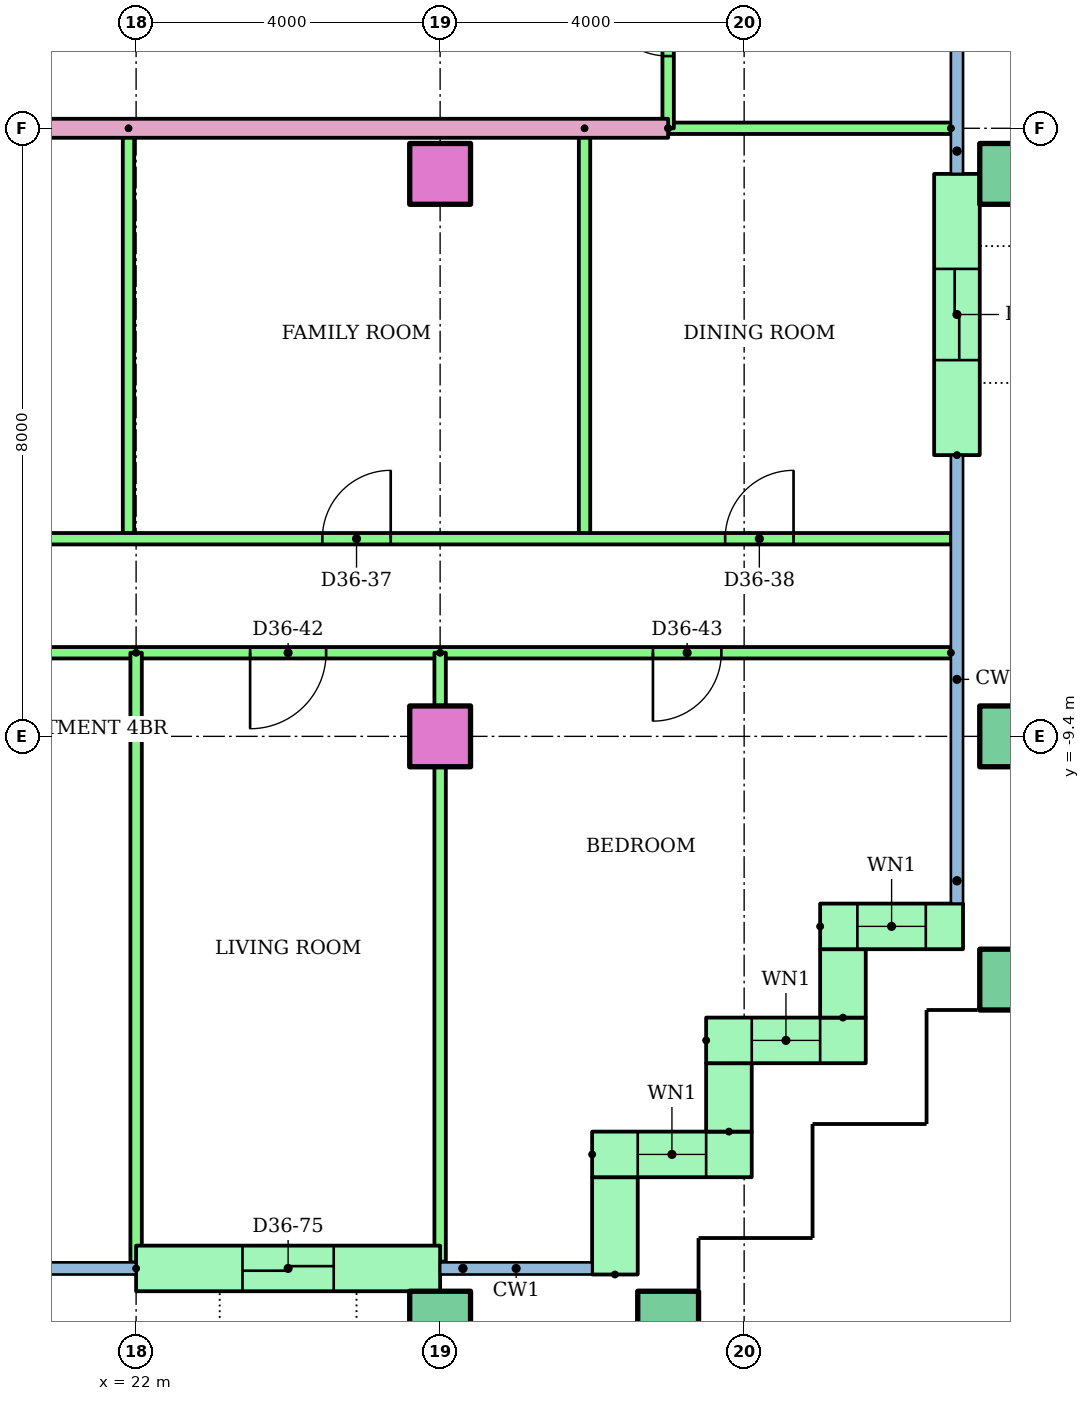
"""IFC4 building model, lengths in metres.
Left out: names, types, materials, properties, quantities, classifications, styles, units other than length and angle.
Written with IfcOpenShell. Run it as: python <this file> out.ifc"""

import sys

from ifc_helpers import new_model, si_unit, direction, frame, frame_2d, origin, origin_2d, place, context, subcontext, project, spatial, rectangle, hollow_rectangle, extrude, element, fill, save


model = new_model("IFC4")
c1 = context("Model", 3, precision=1e-05, world=origin(), true_north=direction((0.0, 1.0)))
c2 = subcontext(c1, "Body", "Model", "MODEL_VIEW")
j1 = project(units=[si_unit("LENGTHUNIT", "METRE"), si_unit("PLANEANGLEUNIT", "RADIAN")], contexts=[c1])
p1 = place(None, origin())
s1 = spatial("IfcSite", under=j1, at=p1, CompositionType="ELEMENT")
p2 = place(p1, origin())
s2 = spatial("IfcBuilding", under=s1, at=p2, CompositionType="ELEMENT")
p3 = place(p2, frame((0.0, 0.0, 139.0)))
s3 = spatial("IfcBuildingStorey", under=s2, at=p3, CompositionType="ELEMENT", Elevation=139.0)
for number, where in (
    (1, (26.0, -17.1, 0.0)),
    (2, (29.0, -17.1, 0.0)),
    (3, (33.5, -12.6, 0.0)),
):
    element("IfcColumn", number, at=place(p3, frame(where)), inside=s3, PredefinedType="COLUMN", context=c2, shape_type="SweptSolid", body=[
        extrude(hollow_rectangle(XDim=0.8, YDim=0.8, WallThickness=0.04, at=origin_2d()), origin(), (0.0, 0.0, 1.0), 3.2),
    ])
p4 = place(p3, frame((26.0, -9.4, 0.0)))
e4 = element("IfcColumn", 4, at=p4, inside=s3, PredefinedType="COLUMN", context=c2, shape_type="SweptSolid", body=[
    extrude(rectangle(XDim=0.8, YDim=0.8, at=origin_2d()), origin(), (0.0, 0.0, 1.0), 3.2),
])
p5 = place(p3, frame((33.5, -9.4, 0.0)))
e5 = element("IfcColumn", 5, at=p5, inside=s3, PredefinedType="COLUMN", context=c2, shape_type="SweptSolid", body=[
    extrude(hollow_rectangle(XDim=0.8, YDim=0.8, WallThickness=0.04, at=origin_2d()), origin(), (0.0, 0.0, 1.0), 3.2),
])
p6 = place(p3, frame((26.0, -2.0, 0.0)))
e6 = element("IfcColumn", 6, at=p6, inside=s3, PredefinedType="COLUMN", context=c2, shape_type="SweptSolid", body=[
    extrude(rectangle(XDim=0.8, YDim=0.8, at=origin_2d()), origin(), (0.0, 0.0, 1.0), 3.2),
])
p7 = place(p3, frame((33.5, -2.0, 0.0)))
e7 = element("IfcColumn", 7, at=p7, inside=s3, PredefinedType="COLUMN", context=c2, shape_type="SweptSolid", body=[
    extrude(hollow_rectangle(XDim=0.8, YDim=0.8, WallThickness=0.04, at=origin_2d()), origin(), (0.0, 0.0, 1.0), 3.2),
])
p8 = place(p3, frame((22.0, -16.4, 0.0)))
e8 = element("IfcWall", 8, at=p8, inside=s3, PredefinedType="STANDARD", context=c2, shape_type="SweptSolid", body=[
    extrude(rectangle(XDim=4.0, YDim=0.6, at=frame_2d((2.0, 0.0))), origin(), (0.0, 0.0, 1.0), 2.92),
])
p9 = place(p8, frame((1.4, 0.0, 0.0)))
e9 = element("IfcOpeningElement", 9, at=p9, cuts=e8, PredefinedType="OPENING", context=c2, shape_type="SweptSolid", body=[
    extrude(rectangle(XDim=1.2, YDim=2.1, at=frame_2d((0.6, 1.05))), frame((0.0, 0.31, 0.0), z_axis=(0.0, -1.0, 0.0), x_axis=(1.0, 0.0, 0.0)), (0.0, 0.0, 1.0), 0.62),
])
p10 = place(p3, frame((28.3, -16.48, 0.0), z_axis=(0.0, 0.0, 1.0), x_axis=(0.0, 1.0, 0.0)))
e10 = element("IfcWall", 10, at=p10, inside=s3, PredefinedType="STANDARD", context=c2, shape_type="SweptSolid", body=[
    extrude(rectangle(XDim=1.28, YDim=0.6, at=frame_2d((0.64, 0.0))), origin(), (0.0, 0.0, 1.0), 2.92),
])
p11 = place(p3, frame((28.0, -14.9, 0.0)))
e11 = element("IfcWall", 11, at=p11, inside=s3, PredefinedType="STANDARD", context=c2, shape_type="SweptSolid", body=[
    extrude(rectangle(XDim=2.1, YDim=0.6, at=frame_2d((1.05, 0.0))), origin(), (0.0, 0.0, 1.0), 2.92),
])
p12 = place(p11, frame((0.6, 0.0, 0.9)))
e12 = element("IfcOpeningElement", 12, at=p12, cuts=e11, PredefinedType="OPENING", context=c2, shape_type="SweptSolid", body=[
    extrude(rectangle(XDim=0.9, YDim=1.5, at=frame_2d((0.45, 0.75))), frame((0.0, 0.31, 0.0), z_axis=(0.0, -1.0, 0.0), x_axis=(1.0, 0.0, 0.0)), (0.0, 0.0, 1.0), 0.62),
])
p13 = place(p3, frame((29.8, -14.6, 0.0), z_axis=(0.0, 0.0, 1.0), x_axis=(0.0, 1.0, 0.0)))
e13 = element("IfcWall", 13, at=p13, inside=s3, PredefinedType="STANDARD", context=c2, shape_type="SweptSolid", body=[
    extrude(rectangle(XDim=0.9, YDim=0.6, at=frame_2d((0.45, 0.0))), origin(), (0.0, 0.0, 1.0), 2.92),
])
p14 = place(p3, frame((29.5, -13.4, 0.0)))
e14 = element("IfcWall", 14, at=p14, inside=s3, PredefinedType="STANDARD", context=c2, shape_type="SweptSolid", body=[
    extrude(rectangle(XDim=2.1, YDim=0.6, at=frame_2d((1.05, 0.0))), origin(), (0.0, 0.0, 1.0), 2.92),
])
p15 = place(p14, frame((0.6, 0.0, 0.9)))
e15 = element("IfcOpeningElement", 15, at=p15, cuts=e14, PredefinedType="OPENING", context=c2, shape_type="SweptSolid", body=[
    extrude(rectangle(XDim=0.9, YDim=1.5, at=frame_2d((0.45, 0.75))), frame((0.0, 0.31, 0.0), z_axis=(0.0, -1.0, 0.0), x_axis=(1.0, 0.0, 0.0)), (0.0, 0.0, 1.0), 0.62),
])
p16 = place(p3, frame((31.3, -13.1, 0.0), z_axis=(0.0, 0.0, 1.0), x_axis=(0.0, 1.0, 0.0)))
e16 = element("IfcWall", 16, at=p16, inside=s3, PredefinedType="STANDARD", context=c2, shape_type="SweptSolid", body=[
    extrude(rectangle(XDim=0.9, YDim=0.6, at=frame_2d((0.45, 0.0))), origin(), (0.0, 0.0, 1.0), 2.92),
])
p17 = place(p3, frame((31.0, -11.9, 0.0)))
e17 = element("IfcWall", 17, at=p17, inside=s3, PredefinedType="STANDARD", context=c2, shape_type="SweptSolid", body=[
    extrude(rectangle(XDim=1.88, YDim=0.6, at=frame_2d((0.94, 0.0))), origin(), (0.0, 0.0, 1.0), 2.92),
])
p18 = place(p17, frame((0.49, 0.0, 0.9)))
e18 = element("IfcOpeningElement", 18, at=p18, cuts=e17, PredefinedType="OPENING", context=c2, shape_type="SweptSolid", body=[
    extrude(rectangle(XDim=0.9, YDim=1.5, at=frame_2d((0.45, 0.75))), frame((0.0, 0.31, 0.0), z_axis=(0.0, -1.0, 0.0), x_axis=(1.0, 0.0, 0.0)), (0.0, 0.0, 1.0), 0.62),
])
p19 = place(p3, frame((32.8, -5.7, 0.0), z_axis=(0.0, 0.0, 1.0), x_axis=(0.0, 1.0, 0.0)))
e19 = element("IfcWall", 19, at=p19, inside=s3, PredefinedType="STANDARD", context=c2, shape_type="SweptSolid", body=[
    extrude(rectangle(XDim=3.7, YDim=0.6, at=frame_2d((1.85, 0.0))), origin(), (0.0, 0.0, 1.0), 2.92),
])
p20 = place(p19, frame((1.25, 0.0, 0.0)))
e20 = element("IfcOpeningElement", 20, at=p20, cuts=e19, PredefinedType="OPENING", context=c2, shape_type="SweptSolid", body=[
    extrude(rectangle(XDim=1.2, YDim=2.1, at=frame_2d((0.6, 1.05))), frame((0.0, 0.31, 0.0), z_axis=(0.0, -1.0, 0.0), x_axis=(1.0, 0.0, 0.0)), (0.0, 0.0, 1.0), 0.62),
])
for number, where, z_axis, x_axis in (
    (21, (21.9, -1.4, 0.0), (0.0, 0.0, 1.0), (0.0, -1.0, 0.0)),
    (22, (27.9, -1.4, 0.0), (0.0, 0.0, 1.0), (0.0, -1.0, 0.0)),
):
    element("IfcWall", number, at=place(p3, frame(where, z_axis=z_axis, x_axis=x_axis)), inside=s3, PredefinedType="PARTITIONING", context=c2, shape_type="SweptSolid", body=[
        extrude(rectangle(XDim=5.4, YDim=0.15, at=frame_2d((2.7, 0.0))), origin(), (0.0, 0.0, 1.0), 2.4),
    ])
p21 = place(p3, frame((12.0, -6.8, 0.0)))
e23 = element("IfcWall", 23, at=p21, inside=s3, PredefinedType="PARTITIONING", context=c2, shape_type="SweptSolid", body=[
    extrude(rectangle(XDim=20.72, YDim=0.15, at=frame_2d((10.36, 0.0))), origin(), (0.0, 0.0, 1.0), 2.4),
])
p22 = place(p21, frame((5.7, 0.0, 0.0)))
e24 = element("IfcOpeningElement", 24, at=p22, cuts=e23, PredefinedType="OPENING", context=c2, shape_type="SweptSolid", body=[
    extrude(rectangle(XDim=0.9, YDim=2.1, at=frame_2d((0.45, 1.05))), frame((0.0, 0.085, 0.0), z_axis=(0.0, -1.0, 0.0), x_axis=(1.0, 0.0, 0.0)), (0.0, 0.0, 1.0), 0.17),
])
p23 = place(p21, frame((12.45, 0.0, 0.0)))
e25 = element("IfcOpeningElement", 25, at=p23, cuts=e23, PredefinedType="OPENING", context=c2, shape_type="SweptSolid", body=[
    extrude(rectangle(XDim=0.9, YDim=2.1, at=frame_2d((0.45, 1.05))), frame((0.0, 0.085, 0.0), z_axis=(0.0, -1.0, 0.0), x_axis=(1.0, 0.0, 0.0)), (0.0, 0.0, 1.0), 0.17),
])
p24 = place(p21, frame((17.75, 0.0, 0.0)))
e26 = element("IfcOpeningElement", 26, at=p24, cuts=e23, PredefinedType="OPENING", context=c2, shape_type="SweptSolid", body=[
    extrude(rectangle(XDim=0.9, YDim=2.1, at=frame_2d((0.45, 1.05))), frame((0.0, 0.085, 0.0), z_axis=(0.0, -1.0, 0.0), x_axis=(1.0, 0.0, 0.0)), (0.0, 0.0, 1.0), 0.17),
])
p25 = place(p3, frame((32.72, -8.3, 0.0), z_axis=(0.0, 0.0, 1.0), x_axis=(-1.0, 0.0, 0.0)))
e27 = element("IfcWall", 27, at=p25, inside=s3, PredefinedType="PARTITIONING", context=c2, shape_type="SweptSolid", body=[
    extrude(rectangle(XDim=22.72, YDim=0.15, at=frame_2d((11.36, 0.0))), origin(), (0.0, 0.0, 1.0), 2.4),
])
p26 = place(p25, frame((20.27, 0.0, 0.0)))
e28 = element("IfcOpeningElement", 28, at=p26, cuts=e27, PredefinedType="OPENING", context=c2, shape_type="SweptSolid", body=[
    extrude(rectangle(XDim=0.9, YDim=2.1, at=frame_2d((0.45, 1.05))), frame((0.0, 0.085, 0.0), z_axis=(0.0, -1.0, 0.0), x_axis=(1.0, 0.0, 0.0)), (0.0, 0.0, 1.0), 0.17),
])
p27 = place(p25, frame((16.27, 0.0, 0.0)))
e29 = element("IfcOpeningElement", 29, at=p27, cuts=e27, PredefinedType="OPENING", context=c2, shape_type="SweptSolid", body=[
    extrude(rectangle(XDim=0.9, YDim=2.1, at=frame_2d((0.45, 1.05))), frame((0.0, 0.085, 0.0), z_axis=(0.0, -1.0, 0.0), x_axis=(1.0, 0.0, 0.0)), (0.0, 0.0, 1.0), 0.17),
])
p28 = place(p25, frame((12.27, 0.0, 0.0)))
e30 = element("IfcOpeningElement", 30, at=p28, cuts=e27, PredefinedType="OPENING", context=c2, shape_type="SweptSolid", body=[
    extrude(rectangle(XDim=0.9, YDim=2.1, at=frame_2d((0.45, 1.05))), frame((0.0, 0.085, 0.0), z_axis=(0.0, -1.0, 0.0), x_axis=(1.0, 0.0, 0.0)), (0.0, 0.0, 1.0), 0.17),
])
p29 = place(p25, frame((8.22, 0.0, 0.0)))
e31 = element("IfcOpeningElement", 31, at=p29, cuts=e27, PredefinedType="OPENING", context=c2, shape_type="SweptSolid", body=[
    extrude(rectangle(XDim=1.0, YDim=2.1, at=frame_2d((0.5, 1.05))), frame((0.0, 0.085, 0.0), z_axis=(0.0, -1.0, 0.0), x_axis=(1.0, 0.0, 0.0)), (0.0, 0.0, 1.0), 0.17),
])
p30 = place(p25, frame((3.02, 0.0, 0.0)))
e32 = element("IfcOpeningElement", 32, at=p30, cuts=e27, PredefinedType="OPENING", context=c2, shape_type="SweptSolid", body=[
    extrude(rectangle(XDim=0.9, YDim=2.1, at=frame_2d((0.45, 1.05))), frame((0.0, 0.085, 0.0), z_axis=(0.0, -1.0, 0.0), x_axis=(1.0, 0.0, 0.0)), (0.0, 0.0, 1.0), 0.17),
])
p31 = place(p3, frame((22.0, -8.3, 0.0), z_axis=(0.0, 0.0, 1.0), x_axis=(0.0, -1.0, 0.0)))
e33 = element("IfcWall", 33, at=p31, inside=s3, PredefinedType="PARTITIONING", context=c2, shape_type="SweptSolid", body=[
    extrude(rectangle(XDim=8.021, YDim=0.15, at=frame_2d((4.01, 0.0))), origin(), (0.0, 0.0, 1.0), 2.4),
])
p32 = place(p3, frame((26.0, -8.3, 0.0), z_axis=(0.0, 0.0, 1.0), x_axis=(0.0, -1.0, 0.0)))
e34 = element("IfcWall", 34, at=p32, inside=s3, PredefinedType="PARTITIONING", context=c2, shape_type="SweptSolid", body=[
    extrude(rectangle(XDim=8.01, YDim=0.15, at=frame_2d((4.005, 0.0))), origin(), (0.0, 0.0, 1.0), 2.4),
])
p33 = place(p3, frame((29.0, -1.4, 0.0), z_axis=(0.0, 0.0, 1.0), x_axis=(-1.0, 0.0, 0.0)))
e35 = element("IfcWall", 35, at=p33, inside=s3, PredefinedType="PARTITIONING", context=c2, shape_type="SweptSolid", body=[
    extrude(rectangle(XDim=15.0, YDim=0.25, at=frame_2d((7.5, 0.0))), origin(), (0.0, 0.0, 1.0), 2.4),
])
p34 = place(p3, frame((32.72, -1.4, 0.0), z_axis=(0.0, 0.0, 1.0), x_axis=(-1.0, 0.0, 0.0)))
e36 = element("IfcWall", 36, at=p34, inside=s3, PredefinedType="PARTITIONING", context=c2, shape_type="SweptSolid", body=[
    extrude(rectangle(XDim=3.72, YDim=0.15, at=frame_2d((1.86, 0.0))), origin(), (0.0, 0.0, 1.0), 2.4),
])
p35 = place(p3, frame((29.0, -1.4, 0.0), z_axis=(0.0, 0.0, 1.0), x_axis=(0.0, 1.0, 0.0)))
e37 = element("IfcWall", 37, at=p35, inside=s3, PredefinedType="PARTITIONING", context=c2, shape_type="SweptSolid", body=[
    extrude(rectangle(XDim=2.8, YDim=0.15, at=frame_2d((1.4, 0.0))), origin(), (0.0, 0.0, 1.0), 2.4),
])
p36 = place(p35, frame((0.95, 0.0, 0.0)))
e38 = element("IfcOpeningElement", 38, at=p36, cuts=e37, PredefinedType="OPENING", context=c2, shape_type="SweptSolid", body=[
    extrude(rectangle(XDim=0.9, YDim=2.1, at=frame_2d((0.45, 1.05))), frame((0.0, 0.085, 0.0), z_axis=(0.0, -1.0, 0.0), x_axis=(1.0, 0.0, 0.0)), (0.0, 0.0, 1.0), 0.17),
])
p37 = place(p12, origin())
e39 = element("IfcWindow", 39, at=p37, inside=s3, PartitioningType="SINGLE_PANEL", PredefinedType="WINDOW", context=c2, shape_type="SweptSolid", body=[
    extrude(rectangle(XDim=0.9, YDim=1.5, at=frame_2d((0.45, 0.75))), frame((0.0, 0.03, 0.0), z_axis=(0.0, -1.0, 0.0), x_axis=(1.0, 0.0, 0.0)), (0.0, 0.0, 1.0), 0.06),
])
fill(e12, e39)
p38 = place(p15, origin())
e40 = element("IfcWindow", 40, at=p38, inside=s3, PartitioningType="SINGLE_PANEL", PredefinedType="WINDOW", context=c2, shape_type="SweptSolid", body=[
    extrude(rectangle(XDim=0.9, YDim=1.5, at=frame_2d((0.45, 0.75))), frame((0.0, 0.03, 0.0), z_axis=(0.0, -1.0, 0.0), x_axis=(1.0, 0.0, 0.0)), (0.0, 0.0, 1.0), 0.06),
])
fill(e15, e40)
p39 = place(p18, origin())
e41 = element("IfcWindow", 41, at=p39, inside=s3, PartitioningType="SINGLE_PANEL", PredefinedType="WINDOW", context=c2, shape_type="SweptSolid", body=[
    extrude(rectangle(XDim=0.9, YDim=1.5, at=frame_2d((0.45, 0.75))), frame((0.0, 0.03, 0.0), z_axis=(0.0, -1.0, 0.0), x_axis=(1.0, 0.0, 0.0)), (0.0, 0.0, 1.0), 0.06),
])
fill(e18, e41)
p40 = place(p23, origin())
e42 = element("IfcDoor", 42, at=p40, inside=s3, OperationType="SINGLE_SWING_RIGHT", PredefinedType="DOOR", context=c2, shape_type="SweptSolid", body=[
    extrude(rectangle(XDim=0.9, YDim=2.1, at=frame_2d((0.45, 1.05))), frame((0.0, 0.025, 0.0), z_axis=(0.0, -1.0, 0.0), x_axis=(1.0, 0.0, 0.0)), (0.0, 0.0, 1.0), 0.05),
])
fill(e25, e42)
p41 = place(p24, origin())
e43 = element("IfcDoor", 43, at=p41, inside=s3, OperationType="SINGLE_SWING_RIGHT", PredefinedType="DOOR", context=c2, shape_type="SweptSolid", body=[
    extrude(rectangle(XDim=0.9, YDim=2.1, at=frame_2d((0.45, 1.05))), frame((0.0, 0.025, 0.0), z_axis=(0.0, -1.0, 0.0), x_axis=(1.0, 0.0, 0.0)), (0.0, 0.0, 1.0), 0.05),
])
fill(e26, e43)
p42 = place(p29, origin())
e44 = element("IfcDoor", 44, at=p42, inside=s3, OperationType="SINGLE_SWING_RIGHT", PredefinedType="DOOR", context=c2, shape_type="SweptSolid", body=[
    extrude(rectangle(XDim=1.0, YDim=2.1, at=frame_2d((0.5, 1.05))), frame((0.0, 0.025, 0.0), z_axis=(0.0, -1.0, 0.0), x_axis=(1.0, 0.0, 0.0)), (0.0, 0.0, 1.0), 0.05),
])
fill(e31, e44)
p43 = place(p30, origin())
e45 = element("IfcDoor", 45, at=p43, inside=s3, OperationType="SINGLE_SWING_RIGHT", PredefinedType="DOOR", context=c2, shape_type="SweptSolid", body=[
    extrude(rectangle(XDim=0.9, YDim=2.1, at=frame_2d((0.45, 1.05))), frame((0.0, 0.025, 0.0), z_axis=(0.0, -1.0, 0.0), x_axis=(1.0, 0.0, 0.0)), (0.0, 0.0, 1.0), 0.05),
])
fill(e32, e45)
p44 = place(p36, origin())
e46 = element("IfcDoor", 46, at=p44, inside=s3, OperationType="SINGLE_SWING_RIGHT", PredefinedType="DOOR", context=c2, shape_type="SweptSolid", body=[
    extrude(rectangle(XDim=0.9, YDim=2.1, at=frame_2d((0.45, 1.05))), frame((0.0, 0.025, 0.0), z_axis=(0.0, -1.0, 0.0), x_axis=(1.0, 0.0, 0.0)), (0.0, 0.0, 1.0), 0.05),
])
fill(e38, e46)
p45 = place(p9, origin())
e47 = element("IfcDoor", 47, at=p45, inside=s3, OperationType="SLIDING_TO_LEFT", PredefinedType="DOOR", context=c2, shape_type="SweptSolid", body=[
    extrude(rectangle(XDim=1.2, YDim=2.1, at=frame_2d((0.6, 1.05))), frame((0.0, 0.025, 0.0), z_axis=(0.0, -1.0, 0.0), x_axis=(1.0, 0.0, 0.0)), (0.0, 0.0, 1.0), 0.05),
])
fill(e9, e47)
p46 = place(p20, origin())
e48 = element("IfcDoor", 48, at=p46, inside=s3, OperationType="SLIDING_TO_LEFT", PredefinedType="DOOR", context=c2, shape_type="SweptSolid", body=[
    extrude(rectangle(XDim=1.2, YDim=2.1, at=frame_2d((0.6, 1.05))), frame((0.0, 0.025, 0.0), z_axis=(0.0, -1.0, 0.0), x_axis=(1.0, 0.0, 0.0)), (0.0, 0.0, 1.0), 0.05),
])
fill(e20, e48)
save(model, sys.argv[1])
